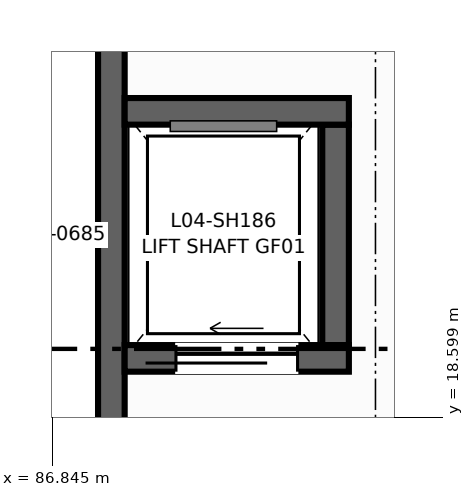
"""IFC4 building model, lengths in metres.
Left out: names, types, materials, properties, quantities, classifications, styles, units other than length and angle.
Written with IfcOpenShell. Run it as: python <this file> out.ifc"""

import sys

from ifc_helpers import new_model, si_unit, direction, frame, frame_2d, origin, place, context, subcontext, project, spatial, rectangle, extrude, element, fill, save


model = new_model("IFC4")
c1 = context("Model", 3, precision=1e-05, world=origin(), true_north=direction((0.0, 1.0)))
c2 = subcontext(c1, "Body", "Model", "MODEL_VIEW")
j1 = project(units=[si_unit("LENGTHUNIT", "METRE"), si_unit("PLANEANGLEUNIT", "RADIAN")], contexts=[c1])
p1 = place(None, origin())
s1 = spatial("IfcSite", under=j1, at=p1, CompositionType="ELEMENT")
p2 = place(p1, origin())
s2 = spatial("IfcBuilding", under=s1, at=p2, CompositionType="ELEMENT")
p3 = place(p2, frame((0.0, 0.0, 18.0)))
s3 = spatial("IfcBuildingStorey", under=s2, at=p3, CompositionType="ELEMENT", Elevation=18.0)
p4 = place(p3, frame((87.625, 18.5, 0.0), z_axis=(0.0, 0.0, 1.0), x_axis=(0.0, 1.0, 0.0)))
e1 = element("IfcWall", 1, at=p4, inside=s3, PredefinedType="SHEAR", context=c2, shape_type="SweptSolid", body=[
    extrude(rectangle(XDim=5.0, YDim=0.35, at=frame_2d((2.5, 0.0))), origin(), (0.0, 0.0, 1.0), 4.26),
])
p5 = place(p3, frame((90.575, 19.55, 0.0), z_axis=(0.0, 0.0, 1.0), x_axis=(0.0, 1.0, 0.0)))
e2 = element("IfcWall", 2, at=p5, inside=s3, PredefinedType="SHEAR", context=c2, shape_type="SweptSolid", body=[
    extrude(rectangle(XDim=2.9, YDim=0.35, at=frame_2d((1.45, 0.0))), origin(), (0.0, 0.0, 1.0), 4.26),
])
p6 = place(p3, frame((87.8, 19.375, 0.0), z_axis=(0.0, 0.0, 1.0), x_axis=(1.0, 0.0, 0.0)))
e3 = element("IfcWall", 3, at=p6, inside=s3, PredefinedType="SHEAR", context=c2, shape_type="SweptSolid", body=[
    extrude(rectangle(XDim=2.95, YDim=0.35, at=frame_2d((1.475, 0.0))), origin(), (0.0, 0.0, 1.0), 4.26),
])
p7 = place(p6, frame((0.675, 0.0, 0.0)))
e4 = element("IfcOpeningElement", 4, at=p7, cuts=e3, PredefinedType="OPENING", context=c2, shape_type="SweptSolid", body=[
    extrude(rectangle(XDim=1.6, YDim=2.35, at=frame_2d((0.8, 1.175))), frame((0.0, 0.185, 0.0), z_axis=(0.0, -1.0, 0.0), x_axis=(1.0, 0.0, 0.0)), (0.0, 0.0, 1.0), 0.37),
])
p8 = place(p3, frame((87.8, 22.625, 0.0), z_axis=(0.0, 0.0, 1.0), x_axis=(1.0, 0.0, 0.0)))
e5 = element("IfcWall", 5, at=p8, inside=s3, PredefinedType="SHEAR", context=c2, shape_type="SweptSolid", body=[
    extrude(rectangle(XDim=2.95, YDim=0.35, at=frame_2d((1.475, 0.0))), origin(), (0.0, 0.0, 1.0), 4.26),
])
p9 = place(p7, origin())
e6 = element("IfcDoor", 6, at=p9, inside=s3, OperationType="SLIDING_TO_LEFT", PredefinedType="DOOR", context=c2, shape_type="SweptSolid", body=[
    extrude(rectangle(XDim=1.6, YDim=2.35, at=frame_2d((0.8, 1.175))), frame((0.0, 0.025, 0.0), z_axis=(0.0, -1.0, 0.0), x_axis=(1.0, 0.0, 0.0)), (0.0, 0.0, 1.0), 0.05),
])
fill(e4, e6)
save(model, sys.argv[1])
